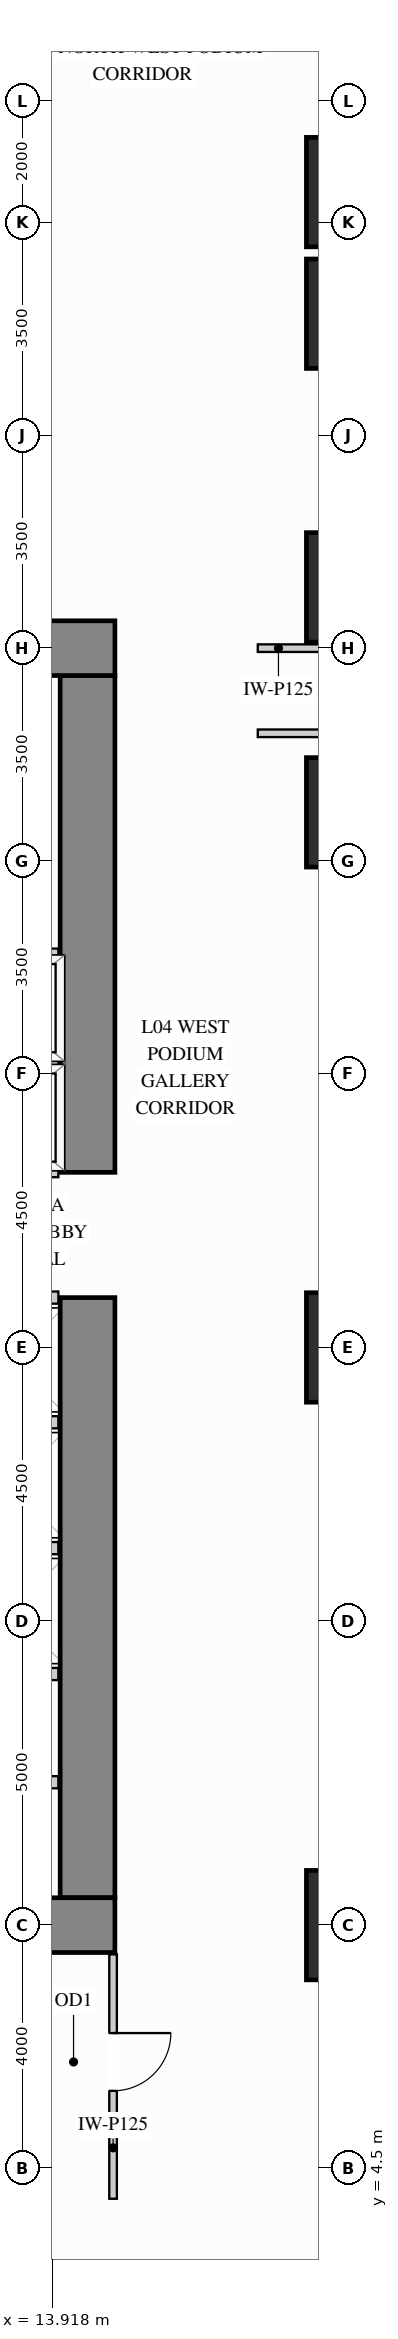
"""IFC4 building model, lengths in metres.
Left out: names, types, materials, properties, quantities, classifications, styles, units other than length and angle.
Written with IfcOpenShell. Run it as: python <this file> out.ifc"""

import sys

from ifc_helpers import new_model, si_unit, direction, frame, frame_2d, origin, origin_2d, place, context, subcontext, project, spatial, rectangle, extrude, source, transform, mapped, element, fill, save


model = new_model("IFC4")
c1 = context("Model", 3, precision=1e-05, world=origin(), true_north=direction((0.0, 1.0)))
c2 = subcontext(c1, "Body", "Model", "MODEL_VIEW")
j1 = project(units=[si_unit("LENGTHUNIT", "METRE"), si_unit("PLANEANGLEUNIT", "RADIAN")], contexts=[c1])
p1 = place(None, origin())
s1 = spatial("IfcSite", under=j1, at=p1, CompositionType="ELEMENT")
p2 = place(p1, origin())
s2 = spatial("IfcBuilding", under=s1, at=p2, CompositionType="ELEMENT")
p3 = place(p2, frame((0.0, 0.0, 18.0)))
s3 = spatial("IfcBuildingStorey", under=s2, at=p3, CompositionType="ELEMENT", Elevation=18.0)
m1 = source(origin(), c2, "Body", "SweptSolid", [
    extrude(rectangle(XDim=1.8, YDim=1.8, at=origin_2d()), origin(), (0.0, 0.0, 1.0), 4.28),
])
for number, where, z_axis, x_axis in (
    (1, (19.0, 8.5, 0.0), (0.0, 0.0, 1.0), (1.0, 0.0, 0.0)),
    (2, (19.0, 18.0, 0.0), (0.0, 0.0, 1.0), (1.0, 0.0, 0.0)),
    (3, (19.0, 26.8, 0.0), (0.0, 0.0, 1.0), (1.0, 0.0, 0.0)),
    (4, (19.0, 30.5, 0.0), (0.0, 0.0, 1.0), (1.0, 0.0, 0.0)),
    (5, (19.0, 35.0, 0.0), (0.0, 0.0, 1.0), (1.0, 0.0, 0.0)),
    (6, (19.0, 37.0, 0.0), (0.0, 0.0, 1.0), (1.0, 0.0, 0.0)),
):
    element("IfcColumn", number, at=place(p3, frame(where, z_axis=z_axis, x_axis=x_axis)), inside=s3, PredefinedType="COLUMN", context=c2, shape_type="MappedRepresentation", body=[
        mapped(m1, transform((0.0, 0.0, 0.0), x_axis=(1.0, 0.0, 0.0), y_axis=(0.0, 1.0, 0.0), z_axis=(0.0, 0.0, 1.0))),
    ])
m2 = source(origin(), c2, "Body", "SweptSolid", [
    extrude(rectangle(XDim=9.87, YDim=0.9, at=frame_2d((4.935, 0.0))), origin(), (0.0, 0.0, 1.0), 4.28),
])
p4 = place(p3, frame((14.5, 8.95, 0.0), z_axis=(0.0, 0.0, 1.0), x_axis=(0.0, 1.0, 0.0)))
e7 = element("IfcWall", 7, at=p4, inside=s3, PredefinedType="SHEAR", context=c2, shape_type="MappedRepresentation", body=[
    mapped(m2, transform((0.0, 0.0, 0.0), x_axis=(1.0, 0.0, 0.0), y_axis=(0.0, 1.0, 0.0), z_axis=(0.0, 0.0, 1.0))),
])
m3 = source(origin(), c2, "Body", "SweptSolid", [
    extrude(rectangle(XDim=8.17, YDim=0.9, at=frame_2d((4.085, 0.0))), origin(), (0.0, 0.0, 1.0), 4.28),
])
p5 = place(p3, frame((14.5, 20.88, 0.0), z_axis=(0.0, 0.0, 1.0), x_axis=(0.0, 1.0, 0.0)))
e8 = element("IfcWall", 8, at=p5, inside=s3, PredefinedType="SHEAR", context=c2, shape_type="MappedRepresentation", body=[
    mapped(m3, transform((0.0, 0.0, 0.0), x_axis=(1.0, 0.0, 0.0), y_axis=(0.0, 1.0, 0.0), z_axis=(0.0, 0.0, 1.0))),
])
m4 = source(origin(), c2, "Body", "SweptSolid", [
    extrude(rectangle(XDim=10.9, YDim=0.9, at=frame_2d((5.45, 0.0))), origin(), (0.0, 0.0, 1.0), 4.28),
])
for number, where, z_axis, x_axis in (
    (9, (4.05, 29.5, 0.0), (0.0, 0.0, 1.0), (1.0, 0.0, 0.0)),
    (10, (4.05, 8.5, 0.0), (0.0, 0.0, 1.0), (1.0, 0.0, 0.0)),
):
    element("IfcWall", number, at=place(p3, frame(where, z_axis=z_axis, x_axis=x_axis)), inside=s3, PredefinedType="SHEAR", context=c2, shape_type="MappedRepresentation", body=[
        mapped(m4, transform((0.0, 0.0, 0.0), x_axis=(1.0, 0.0, 0.0), y_axis=(0.0, 1.0, 0.0), z_axis=(0.0, 0.0, 1.0))),
    ])
m5 = source(origin(), c2, "Body", "SweptSolid", [
    extrude(rectangle(XDim=2.85, YDim=0.125, at=frame_2d((1.425, 0.0))), origin(), (0.0, 0.0, 1.0), 4.265),
])
p6 = place(p3, frame((17.3, 29.5, 0.0), z_axis=(0.0, 0.0, 1.0), x_axis=(1.0, 0.0, 0.0)))
e11 = element("IfcWall", 11, at=p6, inside=s3, PredefinedType="PARTITIONING", context=c2, shape_type="MappedRepresentation", body=[
    mapped(m5, transform((0.0, 0.0, 0.0), x_axis=(1.0, 0.0, 0.0), y_axis=(0.0, 1.0, 0.0), z_axis=(0.0, 0.0, 1.0))),
])
m6 = source(origin(), c2, "Body", "SweptSolid", [
    extrude(rectangle(XDim=8.3, YDim=0.125, at=frame_2d((4.15, 0.0))), origin(), (0.0, 0.0, 1.0), 4.265),
])
p7 = place(p3, frame((17.3, 28.1, 0.0), z_axis=(0.0, 0.0, 1.0), x_axis=(1.0, 0.0, 0.0)))
e12 = element("IfcWall", 12, at=p7, inside=s3, PredefinedType="PARTITIONING", context=c2, shape_type="MappedRepresentation", body=[
    mapped(m6, transform((0.0, 0.0, 0.0), x_axis=(1.0, 0.0, 0.0), y_axis=(0.0, 1.0, 0.0), z_axis=(0.0, 0.0, 1.0))),
])
p8 = place(p3, frame((14.92, 4.0, 0.0), z_axis=(0.0, 0.0, 1.0), x_axis=(0.0, 1.0, 0.0)))
e13 = element("IfcWall", 13, at=p8, inside=s3, PredefinedType="PARTITIONING", context=c2, shape_type="SweptSolid", body=[
    extrude(rectangle(XDim=4.02, YDim=0.125, at=frame_2d((2.01, 0.0))), origin(), (0.0, 0.0, 1.0), 4.265),
])
p9 = place(p8, frame((1.775, 0.0, 0.0)))
e14 = element("IfcOpeningElement", 14, at=p9, cuts=e13, PredefinedType="OPENING", context=c2, shape_type="SweptSolid", body=[
    extrude(rectangle(XDim=0.95, YDim=2.15, at=frame_2d((0.475, 1.075))), frame((0.0, 0.073, 0.0), z_axis=(0.0, -1.0, 0.0), x_axis=(1.0, 0.0, 0.0)), (0.0, 0.0, 1.0), 0.145),
])
m7 = source(origin(), c2, "Body", "SweptSolid", [
    extrude(rectangle(XDim=1.6, YDim=0.2, at=frame_2d((0.8, 0.0))), origin(), (0.0, 0.0, 1.0), 4.265),
])
p10 = place(p3, frame((12.42, 10.85, 0.0), z_axis=(0.0, 0.0, 1.0), x_axis=(1.0, 0.0, 0.0)))
e15 = element("IfcWall", 15, at=p10, inside=s3, PredefinedType="PARTITIONING", context=c2, shape_type="MappedRepresentation", body=[
    mapped(m7, transform((0.0, 0.0, 0.0), x_axis=(1.0, 0.0, 0.0), y_axis=(0.0, 1.0, 0.0), z_axis=(0.0, 0.0, 1.0))),
])
m8 = source(origin(), c2, "Body", "SweptSolid", [
    extrude(rectangle(XDim=2.19, YDim=0.2, at=frame_2d((1.095, 0.0))), origin(), (0.0, 0.0, 1.0), 4.265),
])
for number, where, z_axis, x_axis in (
    (16, (11.83, 22.66, 0.0), (0.0, 0.0, 1.0), (1.0, 0.0, 0.0)),
    (17, (11.83, 20.9, 0.0), (0.0, 0.0, 1.0), (1.0, 0.0, 0.0)),
    (18, (11.83, 24.46, 0.0), (0.0, 0.0, 1.0), (1.0, 0.0, 0.0)),
):
    element("IfcWall", number, at=place(p3, frame(where, z_axis=z_axis, x_axis=x_axis)), inside=s3, PredefinedType="PARTITIONING", context=c2, shape_type="MappedRepresentation", body=[
        mapped(m8, transform((0.0, 0.0, 0.0), x_axis=(1.0, 0.0, 0.0), y_axis=(0.0, 1.0, 0.0), z_axis=(0.0, 0.0, 1.0))),
    ])
m9 = source(origin(), c2, "Body", "SweptSolid", [
    extrude(rectangle(XDim=1.79, YDim=0.2, at=frame_2d((0.895, 0.0))), origin(), (0.0, 0.0, 1.0), 4.265),
])
for number, where, z_axis, x_axis in (
    (19, (12.23, 14.7, 0.0), (0.0, 0.0, 1.0), (1.0, 0.0, 0.0)),
    (20, (12.23, 12.63, 0.0), (0.0, 0.0, 1.0), (1.0, 0.0, 0.0)),
    (21, (12.23, 16.77, 0.0), (0.0, 0.0, 1.0), (1.0, 0.0, 0.0)),
    (22, (12.23, 18.82, 0.0), (0.0, 0.0, 1.0), (1.0, 0.0, 0.0)),
):
    element("IfcWall", number, at=place(p3, frame(where, z_axis=z_axis, x_axis=x_axis)), inside=s3, PredefinedType="PARTITIONING", context=c2, shape_type="MappedRepresentation", body=[
        mapped(m9, transform((0.0, 0.0, 0.0), x_axis=(1.0, 0.0, 0.0), y_axis=(0.0, 1.0, 0.0), z_axis=(0.0, 0.0, 1.0))),
    ])
m10 = source(origin(), c2, "Body", "SweptSolid", [
    extrude(rectangle(XDim=0.95, YDim=2.15, at=frame_2d((0.475, 1.075))), frame((0.0, 0.025, 0.0), z_axis=(0.0, -1.0, 0.0), x_axis=(1.0, 0.0, 0.0)), (0.0, 0.0, 1.0), 0.05),
])
p11 = place(p9, origin())
e23 = element("IfcDoor", 23, at=p11, inside=s3, OperationType="SINGLE_SWING_RIGHT", PredefinedType="DOOR", context=c2, shape_type="MappedRepresentation", body=[
    mapped(m10, transform((0.0, 0.0, 0.0), x_axis=(1.0, 0.0, 0.0), y_axis=(0.0, 1.0, 0.0), z_axis=(0.0, 0.0, 1.0))),
])
fill(e14, e23)
save(model, sys.argv[1])
